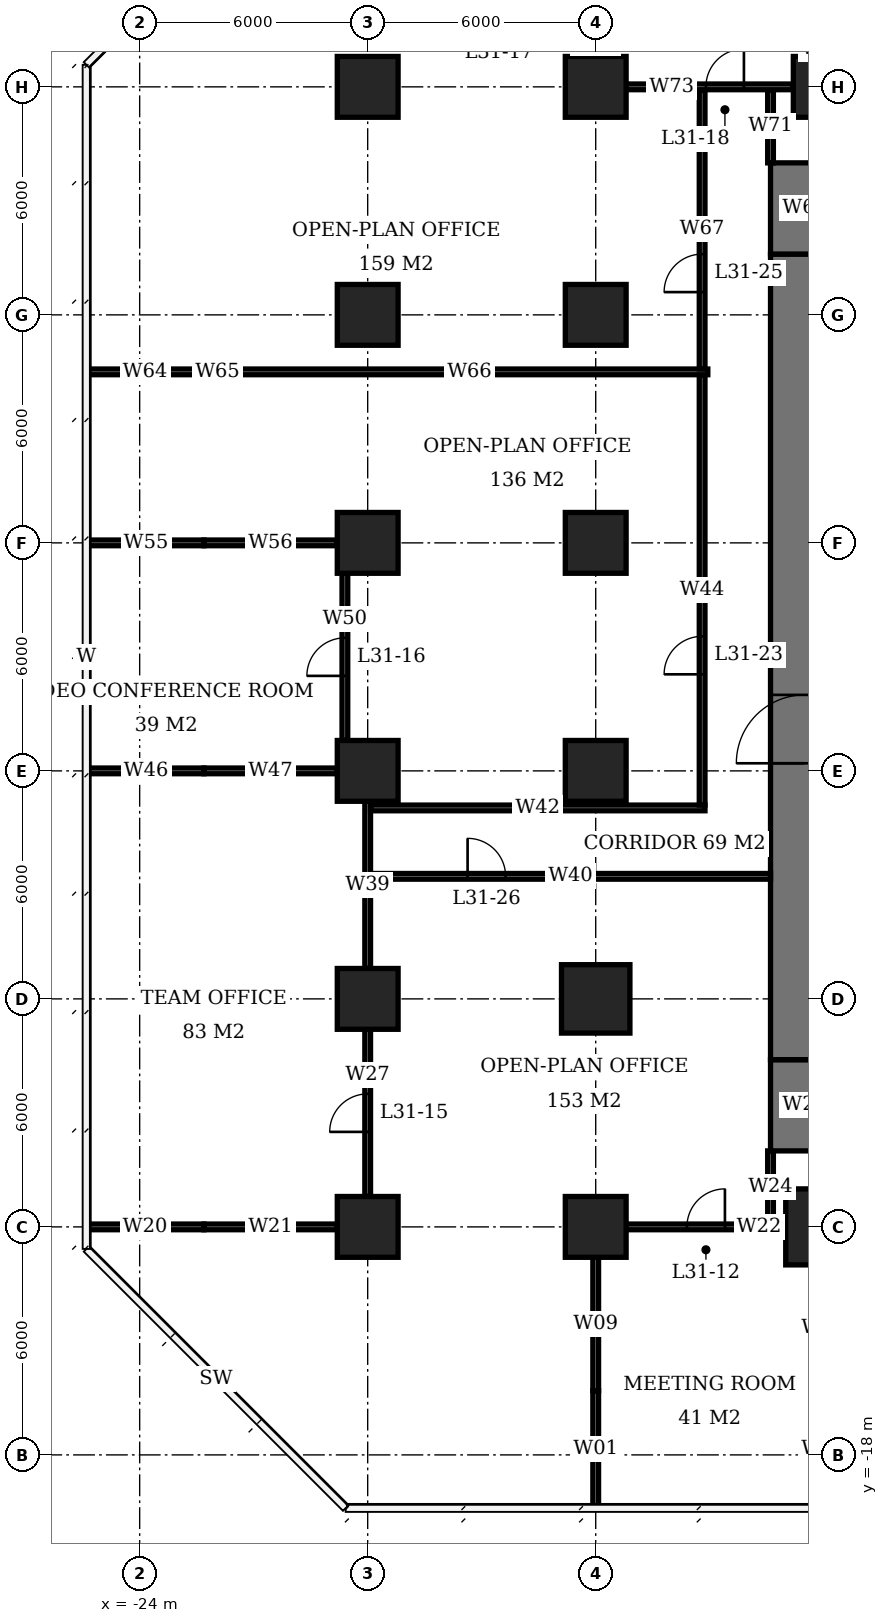
"""IFC4 building model, lengths in metres.
Left out: names, types, materials, properties, quantities, classifications, styles, units other than length and angle.
Written with IfcOpenShell. Run it as: python <this file> out.ifc"""

import sys

from ifc_helpers import new_model, si_unit, direction, frame, frame_2d, origin, origin_2d, place, context, subcontext, project, spatial, rectangle, extrude, element, fill, save


model = new_model("IFC4")
c1 = context("Model", 3, precision=1e-05, world=origin(), true_north=direction((0.0, 1.0)))
c2 = subcontext(c1, "Body", "Model", "MODEL_VIEW")
j1 = project(units=[si_unit("LENGTHUNIT", "METRE"), si_unit("PLANEANGLEUNIT", "RADIAN")], contexts=[c1])
p1 = place(None, origin())
s1 = spatial("IfcSite", under=j1, at=p1, CompositionType="ELEMENT")
p2 = place(p1, origin())
s2 = spatial("IfcBuilding", under=s1, at=p2, CompositionType="ELEMENT")
p3 = place(p2, frame((0.0, 0.0, 128.9)))
s3 = spatial("IfcBuildingStorey", under=s2, at=p3, CompositionType="ELEMENT", Elevation=128.9)
for number, where, z_axis, x_axis in (
    (1, (-18.0, -12.0, 0.0), (0.0, 0.0, 1.0), (1.0, 0.0, 0.0)),
    (2, (-18.0, -6.0, 0.0), (0.0, 0.0, 1.0), (1.0, 0.0, 0.0)),
    (3, (-18.0, 0.0, 0.0), (0.0, 0.0, 1.0), (1.0, 0.0, 0.0)),
    (4, (-18.0, 6.0, 0.0), (0.0, 0.0, 1.0), (1.0, 0.0, 0.0)),
    (5, (-18.0, 12.0, 0.0), (0.0, 0.0, 1.0), (1.0, 0.0, 0.0)),
    (6, (-18.0, 18.0, 0.0), (0.0, 0.0, 1.0), (1.0, 0.0, 0.0)),
    (7, (-12.0, -12.0, 0.0), (0.0, 0.0, 1.0), (1.0, 0.0, 0.0)),
):
    element("IfcColumn", number, at=place(p3, frame(where, z_axis=z_axis, x_axis=x_axis)), inside=s3, PredefinedType="COLUMN", context=c2, shape_type="SweptSolid", body=[
        extrude(rectangle(XDim=1.6, YDim=1.6, at=origin_2d()), origin(), (0.0, 0.0, 1.0), 3.9),
    ])
p4 = place(p3, frame((-12.0, -6.0, 0.0), z_axis=(0.0, 0.0, 1.0), x_axis=(1.0, 0.0, 0.0)))
e8 = element("IfcColumn", 8, at=p4, inside=s3, PredefinedType="COLUMN", context=c2, shape_type="SweptSolid", body=[
    extrude(rectangle(XDim=1.8, YDim=1.8, at=origin_2d()), origin(), (0.0, 0.0, 1.0), 3.9),
])
for number, where, z_axis, x_axis in (
    (9, (-12.0, 0.0, 0.0), (0.0, 0.0, 1.0), (1.0, 0.0, 0.0)),
    (10, (-12.0, 6.0, 0.0), (0.0, 0.0, 1.0), (1.0, 0.0, 0.0)),
    (11, (-12.0, 12.0, 0.0), (0.0, 0.0, 1.0), (1.0, 0.0, 0.0)),
    (12, (-12.0, 18.0, 0.0), (0.0, 0.0, 1.0), (1.0, 0.0, 0.0)),
):
    element("IfcColumn", number, at=place(p3, frame(where, z_axis=z_axis, x_axis=x_axis)), inside=s3, PredefinedType="COLUMN", context=c2, shape_type="SweptSolid", body=[
        extrude(rectangle(XDim=1.6, YDim=1.6, at=origin_2d()), origin(), (0.0, 0.0, 1.0), 3.9),
    ])
p5 = place(p3, frame((-6.0, -12.0, 0.0), z_axis=(0.0, 0.0, 1.0), x_axis=(1.0, 0.0, 0.0)))
e13 = element("IfcColumn", 13, at=p5, inside=s3, PredefinedType="COLUMN", context=c2, shape_type="SweptSolid", body=[
    extrude(rectangle(XDim=2.0, YDim=2.0, at=origin_2d()), origin(), (0.0, 0.0, 1.0), 3.9),
])
p6 = place(p3, frame((-6.0, 18.0, 0.0), z_axis=(0.0, 0.0, 1.0), x_axis=(1.0, 0.0, 0.0)))
e14 = element("IfcColumn", 14, at=p6, inside=s3, PredefinedType="COLUMN", context=c2, shape_type="SweptSolid", body=[
    extrude(rectangle(XDim=1.6, YDim=1.6, at=origin_2d()), origin(), (0.0, 0.0, 1.0), 3.9),
])
p7 = place(p3, frame((-6.5, -7.6, 0.0), z_axis=(0.0, 0.0, 1.0), x_axis=(0.0, 1.0, 0.0)))
e15 = element("IfcWall", 15, at=p7, inside=s3, PredefinedType="SHEAR", context=c2, shape_type="SweptSolid", body=[
    extrude(rectangle(XDim=21.2, YDim=1.8, at=frame_2d((10.6, 0.0))), origin(), (0.0, 0.0, 1.0), 3.9),
])
p8 = place(p7, frame((7.8, 0.0, 0.0)))
e16 = element("IfcOpeningElement", 16, at=p8, cuts=e15, PredefinedType="OPENING", context=c2, shape_type="SweptSolid", body=[
    extrude(rectangle(XDim=1.8, YDim=2.4, at=frame_2d((0.9, 1.2))), frame((0.0, 0.91, 0.0), z_axis=(0.0, -1.0, 0.0), x_axis=(1.0, 0.0, 0.0)), (0.0, 0.0, 1.0), 1.82),
])
for number, where, z_axis, x_axis in (
    (17, (-6.5, -10.0, 0.0), (0.0, 0.0, 1.0), (0.0, 1.0, 0.0)),
    (18, (-6.5, 13.6, 0.0), (0.0, 0.0, 1.0), (0.0, 1.0, 0.0)),
):
    element("IfcWall", number, at=place(p3, frame(where, z_axis=z_axis, x_axis=x_axis)), inside=s3, PredefinedType="SHEAR", context=c2, shape_type="SweptSolid", body=[
        extrude(rectangle(XDim=2.4, YDim=1.8, at=frame_2d((1.2, 0.0))), origin(), (0.0, 0.0, 1.0), 3.9),
    ])
p9 = place(p3, frame((-25.4, -12.0, 0.0), z_axis=(0.0, 0.0, 1.0), x_axis=(1.0, 0.0, 0.0)))
e19 = element("IfcWall", 19, at=p9, inside=s3, PredefinedType="PARTITIONING", context=c2, shape_type="SweptSolid", body=[
    extrude(rectangle(XDim=3.09, YDim=0.15, at=frame_2d((1.545, 0.0))), origin(), (0.0, 0.0, 1.0), 3.65),
])
p10 = place(p3, frame((-22.31, -12.0, 0.0), z_axis=(0.0, 0.0, 1.0), x_axis=(1.0, 0.0, 0.0)))
e20 = element("IfcWall", 20, at=p10, inside=s3, PredefinedType="PARTITIONING", context=c2, shape_type="SweptSolid", body=[
    extrude(rectangle(XDim=3.51, YDim=0.15, at=frame_2d((1.755, 0.0))), origin(), (0.0, 0.0, 1.0), 2.65),
])
p11 = place(p3, frame((-11.2, -12.0, 0.0), z_axis=(0.0, 0.0, 1.0), x_axis=(1.0, 0.0, 0.0)))
e21 = element("IfcWall", 21, at=p11, inside=s3, PredefinedType="PARTITIONING", context=c2, shape_type="SweptSolid", body=[
    extrude(rectangle(XDim=4.2, YDim=0.15, at=frame_2d((2.1, 0.0))), origin(), (0.0, 0.0, 1.0), 3.65),
])
p12 = place(p11, frame((1.6, 0.0, 0.0)))
e22 = element("IfcOpeningElement", 22, at=p12, cuts=e21, PredefinedType="OPENING", context=c2, shape_type="SweptSolid", body=[
    extrude(rectangle(XDim=1.0, YDim=2.1, at=frame_2d((0.5, 1.05))), frame((0.0, 0.085, 0.0), z_axis=(0.0, -1.0, 0.0), x_axis=(1.0, 0.0, 0.0)), (0.0, 0.0, 1.0), 0.17),
])
p13 = place(p3, frame((-25.35, 0.0, 0.0), z_axis=(0.0, 0.0, 1.0), x_axis=(1.0, 0.0, 0.0)))
e23 = element("IfcWall", 23, at=p13, inside=s3, PredefinedType="PARTITIONING", context=c2, shape_type="SweptSolid", body=[
    extrude(rectangle(XDim=3.04, YDim=0.15, at=frame_2d((1.52, 0.0))), origin(), (0.0, 0.0, 1.0), 3.65),
])
p14 = place(p3, frame((-22.31, 0.0, 0.0), z_axis=(0.0, 0.0, 1.0), x_axis=(1.0, 0.0, 0.0)))
e24 = element("IfcWall", 24, at=p14, inside=s3, PredefinedType="PARTITIONING", context=c2, shape_type="SweptSolid", body=[
    extrude(rectangle(XDim=3.51, YDim=0.15, at=frame_2d((1.755, 0.0))), origin(), (0.0, 0.0, 1.0), 2.65),
])
p15 = place(p3, frame((-25.35, 6.0, 0.0), z_axis=(0.0, 0.0, 1.0), x_axis=(1.0, 0.0, 0.0)))
e25 = element("IfcWall", 25, at=p15, inside=s3, PredefinedType="PARTITIONING", context=c2, shape_type="SweptSolid", body=[
    extrude(rectangle(XDim=3.04, YDim=0.15, at=frame_2d((1.52, 0.0))), origin(), (0.0, 0.0, 1.0), 3.65),
])
p16 = place(p3, frame((-22.31, 6.0, 0.0), z_axis=(0.0, 0.0, 1.0), x_axis=(1.0, 0.0, 0.0)))
e26 = element("IfcWall", 26, at=p16, inside=s3, PredefinedType="PARTITIONING", context=c2, shape_type="SweptSolid", body=[
    extrude(rectangle(XDim=3.51, YDim=0.15, at=frame_2d((1.755, 0.0))), origin(), (0.0, 0.0, 1.0), 2.65),
])
p17 = place(p3, frame((-11.2, 18.0, 0.0), z_axis=(0.0, 0.0, 1.0), x_axis=(1.0, 0.0, 0.0)))
e27 = element("IfcWall", 27, at=p17, inside=s3, PredefinedType="PARTITIONING", context=c2, shape_type="SweptSolid", body=[
    extrude(rectangle(XDim=4.4, YDim=0.15, at=frame_2d((2.2, 0.0))), origin(), (0.0, 0.0, 1.0), 3.65),
])
p18 = place(p17, frame((2.1, 0.0, 0.0)))
e28 = element("IfcOpeningElement", 28, at=p18, cuts=e27, PredefinedType="OPENING", context=c2, shape_type="SweptSolid", body=[
    extrude(rectangle(XDim=1.0, YDim=2.1, at=frame_2d((0.5, 1.05))), frame((0.0, 0.085, 0.0), z_axis=(0.0, -1.0, 0.0), x_axis=(1.0, 0.0, 0.0)), (0.0, 0.0, 1.0), 0.17),
])
p19 = place(p3, frame((-18.6, 0.8, 0.0), z_axis=(0.0, 0.0, 1.0), x_axis=(0.0, 1.0, 0.0)))
e29 = element("IfcWall", 29, at=p19, inside=s3, PredefinedType="PARTITIONING", context=c2, shape_type="SweptSolid", body=[
    extrude(rectangle(XDim=4.4, YDim=0.15, at=frame_2d((2.2, 0.0))), origin(), (0.0, 0.0, 1.0), 3.65),
])
p20 = place(p19, frame((1.7, 0.0, 0.0)))
e30 = element("IfcOpeningElement", 30, at=p20, cuts=e29, PredefinedType="OPENING", context=c2, shape_type="SweptSolid", body=[
    extrude(rectangle(XDim=1.0, YDim=2.1, at=frame_2d((0.5, 1.05))), frame((0.0, 0.085, 0.0), z_axis=(0.0, -1.0, 0.0), x_axis=(1.0, 0.0, 0.0)), (0.0, 0.0, 1.0), 0.17),
])
p21 = place(p3, frame((-18.0, -11.2, 0.0), z_axis=(0.0, 0.0, 1.0), x_axis=(0.0, 1.0, 0.0)))
e31 = element("IfcWall", 31, at=p21, inside=s3, PredefinedType="PARTITIONING", context=c2, shape_type="SweptSolid", body=[
    extrude(rectangle(XDim=4.4, YDim=0.15, at=frame_2d((2.2, 0.0))), origin(), (0.0, 0.0, 1.0), 3.65),
])
p22 = place(p21, frame((1.7, 0.0, 0.0)))
e32 = element("IfcOpeningElement", 32, at=p22, cuts=e31, PredefinedType="OPENING", context=c2, shape_type="SweptSolid", body=[
    extrude(rectangle(XDim=1.0, YDim=2.1, at=frame_2d((0.5, 1.05))), frame((0.0, 0.085, 0.0), z_axis=(0.0, -1.0, 0.0), x_axis=(1.0, 0.0, 0.0)), (0.0, 0.0, 1.0), 0.17),
])
p23 = place(p3, frame((-18.0, -5.2, 0.0), z_axis=(0.0, 0.0, 1.0), x_axis=(0.0, 1.0, 0.0)))
e33 = element("IfcWall", 33, at=p23, inside=s3, PredefinedType="PARTITIONING", context=c2, shape_type="SweptSolid", body=[
    extrude(rectangle(XDim=4.4, YDim=0.15, at=frame_2d((2.2, 0.0))), origin(), (0.0, 0.0, 1.0), 3.65),
])
p24 = place(p3, frame((-12.0, -19.4, 0.0), z_axis=(0.0, 0.0, 1.0), x_axis=(0.0, 1.0, 0.0)))
e34 = element("IfcWall", 34, at=p24, inside=s3, PredefinedType="PARTITIONING", context=c2, shape_type="SweptSolid", body=[
    extrude(rectangle(XDim=3.09, YDim=0.15, at=frame_2d((1.545, 0.0))), origin(), (0.0, 0.0, 1.0), 3.65),
])
p25 = place(p3, frame((-12.0, -16.31, 0.0), z_axis=(0.0, 0.0, 1.0), x_axis=(0.0, 1.0, 0.0)))
e35 = element("IfcWall", 35, at=p25, inside=s3, PredefinedType="PARTITIONING", context=c2, shape_type="SweptSolid", body=[
    extrude(rectangle(XDim=3.51, YDim=0.15, at=frame_2d((1.755, 0.0))), origin(), (0.0, 0.0, 1.0), 2.65),
])
p26 = place(p3, frame((-12.0, 18.8, 0.0), z_axis=(0.0, 0.0, 1.0), x_axis=(0.0, 1.0, 0.0)))
e36 = element("IfcWall", 36, at=p26, inside=s3, PredefinedType="PARTITIONING", context=c2, shape_type="SweptSolid", body=[
    extrude(rectangle(XDim=0.7, YDim=0.15, at=frame_2d((0.35, 0.0))), origin(), (0.0, 0.0, 1.0), 3.65),
])
p27 = place(p3, frame((-25.4, 10.5, 0.0), z_axis=(0.0, 0.0, 1.0), x_axis=(1.0, 0.0, 0.0)))
e37 = element("IfcWall", 37, at=p27, inside=s3, PredefinedType="PARTITIONING", context=c2, shape_type="SweptSolid", body=[
    extrude(rectangle(XDim=3.09, YDim=0.15, at=frame_2d((1.545, 0.0))), origin(), (0.0, 0.0, 1.0), 3.65),
])
p28 = place(p3, frame((-22.31, 10.5, 0.0), z_axis=(0.0, 0.0, 1.0), x_axis=(1.0, 0.0, 0.0)))
e38 = element("IfcWall", 38, at=p28, inside=s3, PredefinedType="PARTITIONING", context=c2, shape_type="SweptSolid", body=[
    extrude(rectangle(XDim=0.72, YDim=0.15, at=frame_2d((0.36, 0.0))), origin(), (0.0, 0.0, 1.0), 2.65),
])
p29 = place(p3, frame((-21.59, 10.5, 0.0), z_axis=(0.0, 0.0, 1.0), x_axis=(1.0, 0.0, 0.0)))
e39 = element("IfcWall", 39, at=p29, inside=s3, PredefinedType="PARTITIONING", context=c2, shape_type="SweptSolid", body=[
    extrude(rectangle(XDim=12.54, YDim=0.15, at=frame_2d((6.27, 0.0))), origin(), (0.0, 0.0, 1.0), 3.65),
])
p30 = place(p3, frame((-17.925, -2.775, 0.0), z_axis=(0.0, 0.0, 1.0), x_axis=(1.0, 0.0, 0.0)))
e40 = element("IfcWall", 40, at=p30, inside=s3, PredefinedType="PARTITIONING", context=c2, shape_type="SweptSolid", body=[
    extrude(rectangle(XDim=10.525, YDim=0.15, at=frame_2d((5.263, 0.0))), origin(), (0.0, 0.0, 1.0), 3.65),
])
p31 = place(p30, frame((2.554, 0.0, 0.0)))
e41 = element("IfcOpeningElement", 41, at=p31, cuts=e40, PredefinedType="OPENING", context=c2, shape_type="SweptSolid", body=[
    extrude(rectangle(XDim=1.0, YDim=2.1, at=frame_2d((0.5, 1.05))), frame((0.0, 0.085, 0.0), z_axis=(0.0, -1.0, 0.0), x_axis=(1.0, 0.0, 0.0)), (0.0, 0.0, 1.0), 0.17),
])
p32 = place(p3, frame((-17.925, -0.975, 0.0), z_axis=(0.0, 0.0, 1.0), x_axis=(1.0, 0.0, 0.0)))
e42 = element("IfcWall", 42, at=p32, inside=s3, PredefinedType="PARTITIONING", context=c2, shape_type="SweptSolid", body=[
    extrude(rectangle(XDim=8.8, YDim=0.15, at=frame_2d((4.4, 0.0))), origin(), (0.0, 0.0, 1.0), 3.65),
])
p33 = place(p3, frame((-9.2, -0.9, 0.0), z_axis=(0.0, 0.0, 1.0), x_axis=(0.0, 1.0, 0.0)))
e43 = element("IfcWall", 43, at=p33, inside=s3, PredefinedType="PARTITIONING", context=c2, shape_type="SweptSolid", body=[
    extrude(rectangle(XDim=11.325, YDim=0.15, at=frame_2d((5.663, 0.0))), origin(), (0.0, 0.0, 1.0), 3.65),
])
p34 = place(p33, frame((3.441, 0.0, 0.0)))
e44 = element("IfcOpeningElement", 44, at=p34, cuts=e43, PredefinedType="OPENING", context=c2, shape_type="SweptSolid", body=[
    extrude(rectangle(XDim=1.0, YDim=2.1, at=frame_2d((0.5, 1.05))), frame((0.0, 0.085, 0.0), z_axis=(0.0, -1.0, 0.0), x_axis=(1.0, 0.0, 0.0)), (0.0, 0.0, 1.0), 0.17),
])
p35 = place(p3, frame((-9.2, 10.575, 0.0), z_axis=(0.0, 0.0, 1.0), x_axis=(0.0, 1.0, 0.0)))
e45 = element("IfcWall", 45, at=p35, inside=s3, PredefinedType="PARTITIONING", context=c2, shape_type="SweptSolid", body=[
    extrude(rectangle(XDim=7.35, YDim=0.15, at=frame_2d((3.675, 0.0))), origin(), (0.0, 0.0, 1.0), 3.65),
])
p36 = place(p35, frame((2.024, 0.0, 0.0)))
e46 = element("IfcOpeningElement", 46, at=p36, cuts=e45, PredefinedType="OPENING", context=c2, shape_type="SweptSolid", body=[
    extrude(rectangle(XDim=1.0, YDim=2.1, at=frame_2d((0.5, 1.05))), frame((0.0, 0.085, 0.0), z_axis=(0.0, -1.0, 0.0), x_axis=(1.0, 0.0, 0.0)), (0.0, 0.0, 1.0), 0.17),
])
for number, where, z_axis, x_axis in (
    (47, (-7.4, -11.925, 0.0), (0.0, 0.0, 1.0), (0.0, 1.0, 0.0)),
    (48, (-7.4, 16.0, 0.0), (0.0, 0.0, 1.0), (0.0, 1.0, 0.0)),
):
    element("IfcWall", number, at=place(p3, frame(where, z_axis=z_axis, x_axis=x_axis)), inside=s3, PredefinedType="PARTITIONING", context=c2, shape_type="SweptSolid", body=[
        extrude(rectangle(XDim=1.925, YDim=0.15, at=frame_2d((0.962, 0.0))), origin(), (0.0, 0.0, 1.0), 3.65),
    ])
p37 = place(p8, origin())
e49 = element("IfcDoor", 49, at=p37, inside=s3, OperationType="DOUBLE_DOOR_SINGLE_SWING", PredefinedType="DOOR", context=c2, shape_type="SweptSolid", body=[
    extrude(rectangle(XDim=1.8, YDim=2.4, at=frame_2d((0.9, 1.2))), frame((0.0, 0.025, 0.0), z_axis=(0.0, -1.0, 0.0), x_axis=(1.0, 0.0, 0.0)), (0.0, 0.0, 1.0), 0.05),
])
fill(e16, e49)
p38 = place(p12, origin())
e50 = element("IfcDoor", 50, at=p38, inside=s3, OperationType="SINGLE_SWING_RIGHT", PredefinedType="DOOR", context=c2, shape_type="SweptSolid", body=[
    extrude(rectangle(XDim=1.0, YDim=2.1, at=frame_2d((0.5, 1.05))), frame((0.0, 0.025, 0.0), z_axis=(0.0, -1.0, 0.0), x_axis=(1.0, 0.0, 0.0)), (0.0, 0.0, 1.0), 0.05),
])
fill(e22, e50)
p39 = place(p22, origin())
e51 = element("IfcDoor", 51, at=p39, inside=s3, OperationType="SINGLE_SWING_LEFT", PredefinedType="DOOR", context=c2, shape_type="SweptSolid", body=[
    extrude(rectangle(XDim=1.0, YDim=2.1, at=frame_2d((0.5, 1.05))), frame((0.0, 0.025, 0.0), z_axis=(0.0, -1.0, 0.0), x_axis=(1.0, 0.0, 0.0)), (0.0, 0.0, 1.0), 0.05),
])
fill(e32, e51)
p40 = place(p20, origin())
e52 = element("IfcDoor", 52, at=p40, inside=s3, OperationType="SINGLE_SWING_LEFT", PredefinedType="DOOR", context=c2, shape_type="SweptSolid", body=[
    extrude(rectangle(XDim=1.0, YDim=2.1, at=frame_2d((0.5, 1.05))), frame((0.0, 0.025, 0.0), z_axis=(0.0, -1.0, 0.0), x_axis=(1.0, 0.0, 0.0)), (0.0, 0.0, 1.0), 0.05),
])
fill(e30, e52)
p41 = place(p18, origin())
e53 = element("IfcDoor", 53, at=p41, inside=s3, OperationType="SINGLE_SWING_RIGHT", PredefinedType="DOOR", context=c2, shape_type="SweptSolid", body=[
    extrude(rectangle(XDim=1.0, YDim=2.1, at=frame_2d((0.5, 1.05))), frame((0.0, 0.025, 0.0), z_axis=(0.0, -1.0, 0.0), x_axis=(1.0, 0.0, 0.0)), (0.0, 0.0, 1.0), 0.05),
])
fill(e28, e53)
p42 = place(p34, origin())
e54 = element("IfcDoor", 54, at=p42, inside=s3, OperationType="SINGLE_SWING_LEFT", PredefinedType="DOOR", context=c2, shape_type="SweptSolid", body=[
    extrude(rectangle(XDim=1.0, YDim=2.1, at=frame_2d((0.5, 1.05))), frame((0.0, 0.025, 0.0), z_axis=(0.0, -1.0, 0.0), x_axis=(1.0, 0.0, 0.0)), (0.0, 0.0, 1.0), 0.05),
])
fill(e44, e54)
p43 = place(p36, origin())
e55 = element("IfcDoor", 55, at=p43, inside=s3, OperationType="SINGLE_SWING_LEFT", PredefinedType="DOOR", context=c2, shape_type="SweptSolid", body=[
    extrude(rectangle(XDim=1.0, YDim=2.1, at=frame_2d((0.5, 1.05))), frame((0.0, 0.025, 0.0), z_axis=(0.0, -1.0, 0.0), x_axis=(1.0, 0.0, 0.0)), (0.0, 0.0, 1.0), 0.05),
])
fill(e46, e55)
p44 = place(p31, origin())
e56 = element("IfcDoor", 56, at=p44, inside=s3, OperationType="SINGLE_SWING_LEFT", PredefinedType="DOOR", context=c2, shape_type="SweptSolid", body=[
    extrude(rectangle(XDim=1.0, YDim=2.1, at=frame_2d((0.5, 1.05))), frame((0.0, 0.025, 0.0), z_axis=(0.0, -1.0, 0.0), x_axis=(1.0, 0.0, 0.0)), (0.0, 0.0, 1.0), 0.05),
])
fill(e41, e56)
save(model, sys.argv[1])
